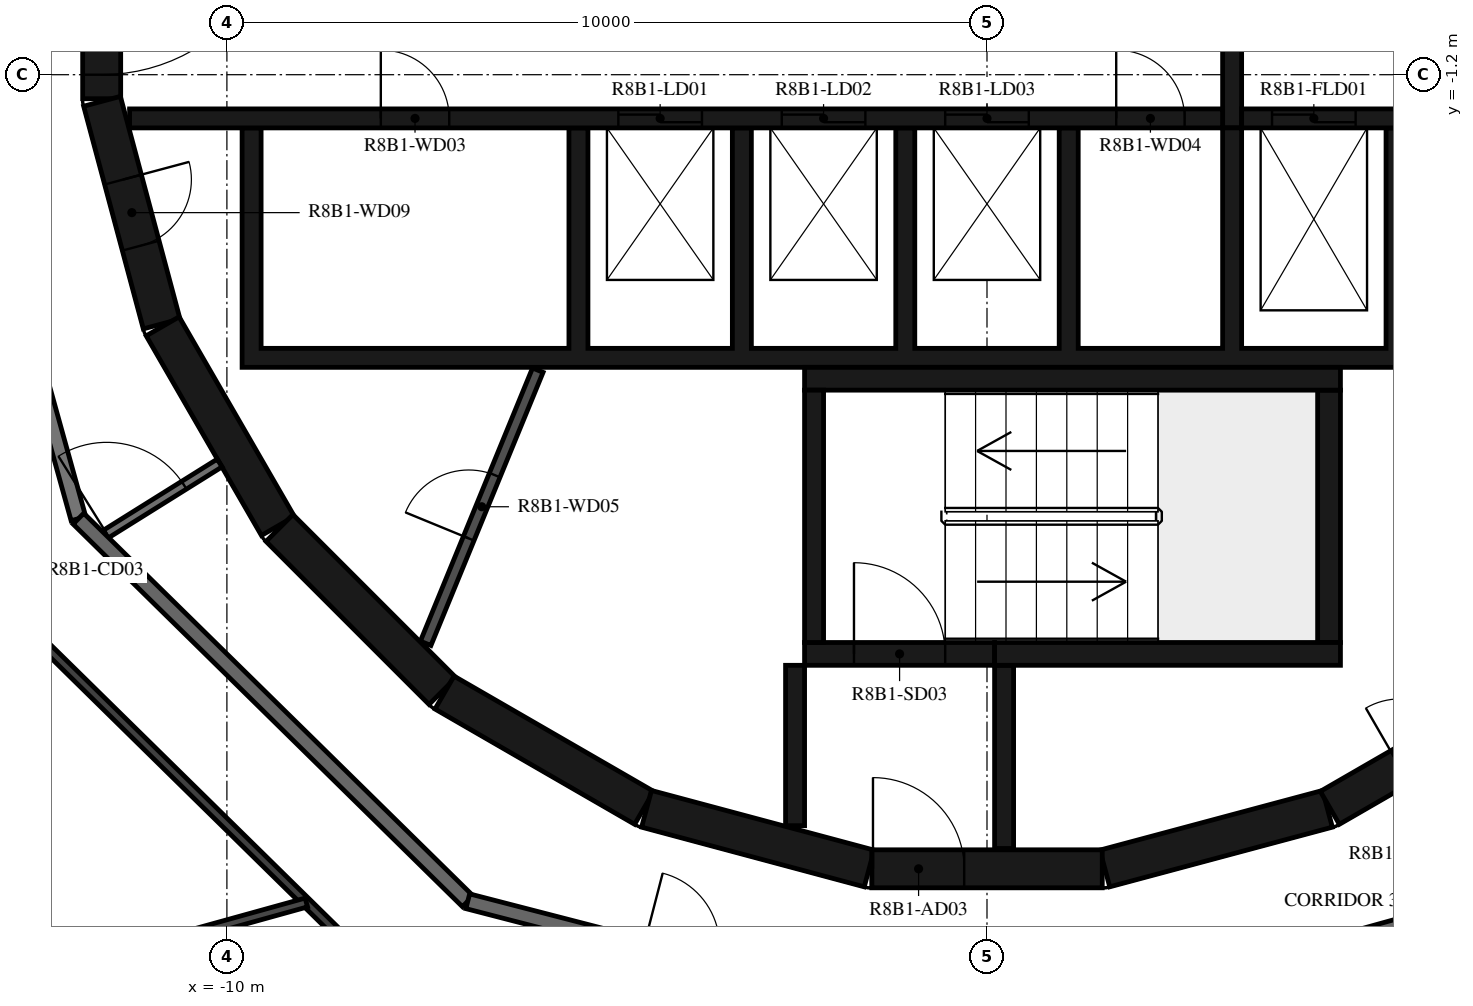
"""IFC4 building model, lengths in metres.
Left out: names, types, materials, properties, quantities, classifications, styles, units other than length and angle.
Written with IfcOpenShell. Run it as: python <this file> out.ifc"""

import sys

from ifc_helpers import new_model, si_unit, direction, frame, frame_2d, origin, place, context, subcontext, project, spatial, polyline, rectangle, outline, extrude, element, fill, save


model = new_model("IFC4")
c1 = context("Model", 3, precision=1e-05, world=origin(), true_north=direction((0.0, 1.0)))
c2 = subcontext(c1, "Body", "Model", "MODEL_VIEW")
j1 = project(units=[si_unit("LENGTHUNIT", "METRE"), si_unit("PLANEANGLEUNIT", "RADIAN")], contexts=[c1])
p1 = place(None, origin())
s1 = spatial("IfcSite", under=j1, at=p1, CompositionType="ELEMENT")
p2 = place(p1, origin())
s2 = spatial("IfcBuilding", under=s1, at=p2, CompositionType="ELEMENT")
p3 = place(p2, frame((0.0, 0.0, 308.7)))
s3 = spatial("IfcBuildingStorey", under=s2, at=p3, CompositionType="ELEMENT", Elevation=308.7)
p4 = place(p3, frame((1.55, -11.643, 0.0), z_axis=(0.0, 0.0, 1.0), x_axis=(0.965948410781, 0.258734743916, 0.0)))
e1 = element("IfcWall", 1, at=p4, inside=s3, PredefinedType="SHEAR", context=c2, shape_type="SweptSolid", body=[
    extrude(rectangle(XDim=3.033, YDim=0.5, at=frame_2d((1.516, 0.0))), origin(), (0.0, 0.0, 1.0), 3.12),
])
p5 = place(p3, frame((4.51, -10.845, 0.0), z_axis=(0.0, 0.0, 1.0), x_axis=(0.865975092491, 0.500087131594, 0.0)))
e2 = element("IfcWall", 2, at=p5, inside=s3, PredefinedType="SHEAR", context=c2, shape_type="SweptSolid", body=[
    extrude(rectangle(XDim=3.033, YDim=0.5, at=frame_2d((1.516, 0.0))), origin(), (0.0, 0.0, 1.0), 3.12),
])
p6 = place(p5, frame((1.066, 0.0, 0.0)))
e3 = element("IfcOpeningElement", 3, at=p6, cuts=e2, PredefinedType="OPENING", context=c2, shape_type="SweptSolid", body=[
    extrude(rectangle(XDim=0.9, YDim=2.1, at=frame_2d((0.45, 1.05))), frame((0.0, 0.26, 0.0), z_axis=(0.0, -1.0, 0.0), x_axis=(1.0, 0.0, 0.0)), (0.0, 0.0, 1.0), 0.52),
])
p7 = place(p3, frame((-11.647, 1.516, 0.0), z_axis=(0.0, 0.0, 1.0), x_axis=(0.0, -1.0, 0.0)))
e4 = element("IfcWall", 4, at=p7, inside=s3, PredefinedType="SHEAR", context=c2, shape_type="SweptSolid", body=[
    extrude(rectangle(XDim=3.033, YDim=0.5, at=frame_2d((1.516, 0.0))), origin(), (0.0, 0.0, 1.0), 3.12),
])
p8 = place(p7, frame((0.316, 0.0, 0.0)))
e5 = element("IfcOpeningElement", 5, at=p8, cuts=e4, PredefinedType="OPENING", context=c2, shape_type="SweptSolid", body=[
    extrude(rectangle(XDim=2.4, YDim=2.1, at=frame_2d((1.2, 1.05))), frame((0.0, 0.26, 0.0), z_axis=(0.0, -1.0, 0.0), x_axis=(1.0, 0.0, 0.0)), (0.0, 0.0, 1.0), 0.52),
])
p9 = place(p3, frame((-11.643, -1.55, 0.0), z_axis=(0.0, 0.0, 1.0), x_axis=(0.258734743916, -0.965948410781, 0.0)))
e6 = element("IfcWall", 6, at=p9, inside=s3, PredefinedType="SHEAR", context=c2, shape_type="SweptSolid", body=[
    extrude(rectangle(XDim=3.033, YDim=0.5, at=frame_2d((1.516, 0.0))), origin(), (0.0, 0.0, 1.0), 3.12),
])
p10 = place(p9, frame((1.066, 0.0, 0.0)))
e7 = element("IfcOpeningElement", 7, at=p10, cuts=e6, PredefinedType="OPENING", context=c2, shape_type="SweptSolid", body=[
    extrude(rectangle(XDim=0.9, YDim=2.1, at=frame_2d((0.45, 1.05))), frame((0.0, 0.26, 0.0), z_axis=(0.0, -1.0, 0.0), x_axis=(1.0, 0.0, 0.0)), (0.0, 0.0, 1.0), 0.52),
])
p11 = place(p3, frame((-10.845, -4.51, 0.0), z_axis=(0.0, 0.0, 1.0), x_axis=(0.500087131594, -0.865975092491, 0.0)))
e8 = element("IfcWall", 8, at=p11, inside=s3, PredefinedType="SHEAR", context=c2, shape_type="SweptSolid", body=[
    extrude(rectangle(XDim=3.033, YDim=0.5, at=frame_2d((1.516, 0.0))), origin(), (0.0, 0.0, 1.0), 3.12),
])
p12 = place(p3, frame((-9.308, -7.164, 0.0), z_axis=(0.0, 0.0, 1.0), x_axis=(0.707106781187, -0.707106781187, 0.0)))
e9 = element("IfcWall", 9, at=p12, inside=s3, PredefinedType="SHEAR", context=c2, shape_type="SweptSolid", body=[
    extrude(rectangle(XDim=3.032, YDim=0.5, at=frame_2d((1.516, 0.0))), origin(), (0.0, 0.0, 1.0), 3.12),
])
for number, where, z_axis, x_axis in (
    (10, (-7.137, -9.329, 0.0), (0.0, 0.0, 1.0), (0.866, -0.5, 0.0)),
    (11, (-4.479, -10.858, 0.0), (0.0, 0.0, 1.0), (0.966, -0.259, 0.0)),
):
    element("IfcWall", number, at=place(p3, frame(where, z_axis=z_axis, x_axis=x_axis)), inside=s3, PredefinedType="SHEAR", context=c2, shape_type="SweptSolid", body=[
        extrude(rectangle(XDim=3.033, YDim=0.5, at=frame_2d((1.516, 0.0))), origin(), (0.0, 0.0, 1.0), 3.12),
    ])
p13 = place(p3, frame((-1.516, -11.647, 0.0), z_axis=(0.0, 0.0, 1.0), x_axis=(1.0, 0.0, 0.0)))
e12 = element("IfcWall", 12, at=p13, inside=s3, PredefinedType="SHEAR", context=c2, shape_type="SweptSolid", body=[
    extrude(rectangle(XDim=3.033, YDim=0.5, at=frame_2d((1.516, 0.0))), origin(), (0.0, 0.0, 1.0), 3.12),
])
p14 = place(p13, frame((0.016, 0.0, 0.0)))
e13 = element("IfcOpeningElement", 13, at=p14, cuts=e12, PredefinedType="OPENING", context=c2, shape_type="SweptSolid", body=[
    extrude(rectangle(XDim=1.2, YDim=2.1, at=frame_2d((0.6, 1.05))), frame((0.0, 0.26, 0.0), z_axis=(0.0, -1.0, 0.0), x_axis=(1.0, 0.0, 0.0)), (0.0, 0.0, 1.0), 0.52),
])
p15 = place(p3, frame((-2.275, -8.67, 0.0), z_axis=(0.0, 0.0, 1.0), x_axis=(0.0, 1.0, 0.0)))
e14 = element("IfcWall", 14, at=p15, inside=s3, PredefinedType="SHEAR", context=c2, shape_type="SweptSolid", body=[
    extrude(rectangle(XDim=3.32, YDim=0.25, at=frame_2d((1.66, 0.0))), origin(), (0.0, 0.0, 1.0), 3.12),
])
p16 = place(p3, frame((-2.4, -5.2, 0.0), z_axis=(0.0, 0.0, 1.0), x_axis=(1.0, 0.0, 0.0)))
e15 = element("IfcWall", 15, at=p16, inside=s3, PredefinedType="SHEAR", context=c2, shape_type="SweptSolid", body=[
    extrude(rectangle(XDim=7.05, YDim=0.3, at=frame_2d((3.525, 0.0))), origin(), (0.0, 0.0, 1.0), 3.12),
])
p17 = place(p3, frame((4.5, -8.67, 0.0), z_axis=(0.0, 0.0, 1.0), x_axis=(0.0, 1.0, 0.0)))
e16 = element("IfcWall", 16, at=p17, inside=s3, PredefinedType="SHEAR", context=c2, shape_type="SweptSolid", body=[
    extrude(rectangle(XDim=3.32, YDim=0.3, at=frame_2d((1.66, 0.0))), origin(), (0.0, 0.0, 1.0), 3.12),
])
p18 = place(p3, frame((0.1, -8.82, 0.0), z_axis=(0.0, 0.0, 1.0), x_axis=(1.0, 0.0, 0.0)))
e17 = element("IfcWall", 17, at=p18, inside=s3, PredefinedType="SHEAR", context=c2, shape_type="SweptSolid", body=[
    extrude(rectangle(XDim=4.55, YDim=0.3, at=frame_2d((2.275, 0.0))), origin(), (0.0, 0.0, 1.0), 3.12),
])
p19 = place(p3, frame((-2.4, -8.82, 0.0), z_axis=(0.0, 0.0, 1.0), x_axis=(1.0, 0.0, 0.0)))
e18 = element("IfcWall", 18, at=p19, inside=s3, PredefinedType="SHEAR", context=c2, shape_type="SweptSolid", body=[
    extrude(rectangle(XDim=2.5, YDim=0.3, at=frame_2d((1.25, 0.0))), origin(), (0.0, 0.0, 1.0), 3.12),
])
p20 = place(p19, frame((0.65, 0.0, 0.0)))
e19 = element("IfcOpeningElement", 19, at=p20, cuts=e18, PredefinedType="OPENING", context=c2, shape_type="SweptSolid", body=[
    extrude(rectangle(XDim=1.2, YDim=2.1, at=frame_2d((0.6, 1.05))), frame((0.0, 0.16, 0.0), z_axis=(0.0, -1.0, 0.0), x_axis=(1.0, 0.0, 0.0)), (0.0, 0.0, 1.0), 0.32),
])
p21 = place(p3, frame((-2.525, -8.97, 0.0), z_axis=(0.0, 0.0, 1.0), x_axis=(0.0, -1.0, 0.0)))
e20 = element("IfcWall", 20, at=p21, inside=s3, PredefinedType="SHEAR", context=c2, shape_type="SweptSolid", body=[
    extrude(rectangle(XDim=2.11, YDim=0.25, at=frame_2d((1.055, 0.0))), origin(), (0.0, 0.0, 1.0), 3.12),
])
p22 = place(p3, frame((0.225, -8.97, 0.0), z_axis=(0.0, 0.0, 1.0), x_axis=(0.0, -1.0, 0.0)))
e21 = element("IfcWall", 21, at=p22, inside=s3, PredefinedType="SHEAR", context=c2, shape_type="SweptSolid", body=[
    extrude(rectangle(XDim=2.41, YDim=0.25, at=frame_2d((1.205, 0.0))), origin(), (0.0, 0.0, 1.0), 3.12),
])
p23 = place(p3, origin())
e22 = element("IfcWall", 22, at=p23, inside=s3, PredefinedType="SHEAR", context=c2, shape_type="SweptSolid", body=[
    extrude(outline(polyline([(9.8, -5.05), (9.8, -4.8), (9.8, -1.9), (9.55, -1.9), (9.55, -4.8), (7.65, -4.8), (7.65, -1.9), (7.4, -1.9), (7.4, -4.8), (5.5, -4.8), (5.5, -1.9), (5.25, -1.9), (5.25, -4.8), (3.35, -4.8), (3.35, -1.9), (3.1, -1.9), (3.1, -4.8), (1.2, -4.8), (1.2, -1.9), (0.95, -1.9), (0.95, -4.8), (-0.95, -4.8), (-0.95, -1.9), (-1.2, -1.9), (-1.2, -4.8), (-3.1, -4.8), (-3.1, -1.9), (-3.35, -1.9), (-3.35, -4.8), (-5.25, -4.8), (-5.25, -1.9), (-5.5, -1.9), (-5.5, -4.8), (-9.55, -4.8), (-9.55, -1.9), (-9.8, -1.9), (-9.8, -4.8), (-9.8, -5.05), (9.8, -5.05)])), origin(), (0.0, 0.0, 1.0), 3.12),
])
p24 = place(p3, frame((-11.28, -1.775, 0.0), z_axis=(0.0, 0.0, 1.0), x_axis=(1.0, 0.0, 0.0)))
e23 = element("IfcWall", 23, at=p24, inside=s3, PredefinedType="SHEAR", context=c2, shape_type="SweptSolid", body=[
    extrude(rectangle(XDim=14.38, YDim=0.25, at=frame_2d((7.19, 0.0))), origin(), (0.0, 0.0, 1.0), 3.12),
])
p25 = place(p24, frame((6.43, 0.0, 0.0)))
e24 = element("IfcOpeningElement", 24, at=p25, cuts=e23, PredefinedType="OPENING", context=c2, shape_type="SweptSolid", body=[
    extrude(rectangle(XDim=1.1, YDim=2.1, at=frame_2d((0.55, 1.05))), frame((0.0, 0.135, 0.0), z_axis=(0.0, -1.0, 0.0), x_axis=(1.0, 0.0, 0.0)), (0.0, 0.0, 1.0), 0.27),
])
p26 = place(p24, frame((8.58, 0.0, 0.0)))
e25 = element("IfcOpeningElement", 25, at=p26, cuts=e23, PredefinedType="OPENING", context=c2, shape_type="SweptSolid", body=[
    extrude(rectangle(XDim=1.1, YDim=2.1, at=frame_2d((0.55, 1.05))), frame((0.0, 0.135, 0.0), z_axis=(0.0, -1.0, 0.0), x_axis=(1.0, 0.0, 0.0)), (0.0, 0.0, 1.0), 0.27),
])
p27 = place(p24, frame((10.73, 0.0, 0.0)))
e26 = element("IfcOpeningElement", 26, at=p27, cuts=e23, PredefinedType="OPENING", context=c2, shape_type="SweptSolid", body=[
    extrude(rectangle(XDim=1.1, YDim=2.1, at=frame_2d((0.55, 1.05))), frame((0.0, 0.135, 0.0), z_axis=(0.0, -1.0, 0.0), x_axis=(1.0, 0.0, 0.0)), (0.0, 0.0, 1.0), 0.27),
])
p28 = place(p24, frame((3.305, 0.0, 0.0)))
e27 = element("IfcOpeningElement", 27, at=p28, cuts=e23, PredefinedType="OPENING", context=c2, shape_type="SweptSolid", body=[
    extrude(rectangle(XDim=0.9, YDim=2.1, at=frame_2d((0.45, 1.05))), frame((0.0, 0.135, 0.0), z_axis=(0.0, -1.0, 0.0), x_axis=(1.0, 0.0, 0.0)), (0.0, 0.0, 1.0), 0.27),
])
p29 = place(p24, frame((12.98, 0.0, 0.0)))
e28 = element("IfcOpeningElement", 28, at=p29, cuts=e23, PredefinedType="OPENING", context=c2, shape_type="SweptSolid", body=[
    extrude(rectangle(XDim=0.9, YDim=2.1, at=frame_2d((0.45, 1.05))), frame((0.0, 0.135, 0.0), z_axis=(0.0, -1.0, 0.0), x_axis=(1.0, 0.0, 0.0)), (0.0, 0.0, 1.0), 0.27),
])
p30 = place(p3, frame((3.35, -1.775, 0.0), z_axis=(0.0, 0.0, 1.0), x_axis=(1.0, 0.0, 0.0)))
e29 = element("IfcWall", 29, at=p30, inside=s3, PredefinedType="SHEAR", context=c2, shape_type="SweptSolid", body=[
    extrude(rectangle(XDim=7.93, YDim=0.25, at=frame_2d((3.965, 0.0))), origin(), (0.0, 0.0, 1.0), 3.12),
])
p31 = place(p30, frame((0.4, 0.0, 0.0)))
e30 = element("IfcOpeningElement", 30, at=p31, cuts=e29, PredefinedType="OPENING", context=c2, shape_type="SweptSolid", body=[
    extrude(rectangle(XDim=1.1, YDim=2.4, at=frame_2d((0.55, 1.2))), frame((0.0, 0.135, 0.0), z_axis=(0.0, -1.0, 0.0), x_axis=(1.0, 0.0, 0.0)), (0.0, 0.0, 1.0), 0.27),
])
p32 = place(p30, frame((2.55, 0.0, 0.0)))
e31 = element("IfcOpeningElement", 31, at=p32, cuts=e29, PredefinedType="OPENING", context=c2, shape_type="SweptSolid", body=[
    extrude(rectangle(XDim=1.1, YDim=2.4, at=frame_2d((0.55, 1.2))), frame((0.0, 0.135, 0.0), z_axis=(0.0, -1.0, 0.0), x_axis=(1.0, 0.0, 0.0)), (0.0, 0.0, 1.0), 0.27),
])
p33 = place(p30, frame((4.7, 0.0, 0.0)))
e32 = element("IfcOpeningElement", 32, at=p33, cuts=e29, PredefinedType="OPENING", context=c2, shape_type="SweptSolid", body=[
    extrude(rectangle(XDim=1.1, YDim=2.4, at=frame_2d((0.55, 1.2))), frame((0.0, 0.135, 0.0), z_axis=(0.0, -1.0, 0.0), x_axis=(1.0, 0.0, 0.0)), (0.0, 0.0, 1.0), 0.27),
])
p34 = place(p3, frame((3.225, -1.9, 0.0), z_axis=(0.0, 0.0, 1.0), x_axis=(0.0, 1.0, 0.0)))
e33 = element("IfcWall", 33, at=p34, inside=s3, PredefinedType="SHEAR", context=c2, shape_type="SweptSolid", body=[
    extrude(rectangle(XDim=3.8, YDim=0.25, at=frame_2d((1.9, 0.0))), origin(), (0.0, 0.0, 1.0), 3.12),
])
p35 = place(p3, frame((-7.385, -8.681, 0.0), z_axis=(0.0, 0.0, 1.0), x_axis=(0.379804590409, 0.925066739811, 0.0)))
e34 = element("IfcWall", 34, at=p35, inside=s3, PredefinedType="PARTITIONING", context=c2, shape_type="SweptSolid", body=[
    extrude(rectangle(XDim=3.885, YDim=0.15, at=frame_2d((1.942, 0.0))), origin(), (0.0, 0.0, 1.0), 3.12),
])
p36 = place(p35, frame((1.493, 0.0, 0.0)))
e35 = element("IfcOpeningElement", 35, at=p36, cuts=e34, PredefinedType="OPENING", context=c2, shape_type="SweptSolid", body=[
    extrude(rectangle(XDim=0.9, YDim=2.1, at=frame_2d((0.45, 1.05))), frame((0.0, 0.085, 0.0), z_axis=(0.0, -1.0, 0.0), x_axis=(1.0, 0.0, 0.0)), (0.0, 0.0, 1.0), 0.17),
])
p37 = place(p3, frame((-11.687, -7.303, 0.0), z_axis=(0.0, 0.0, 1.0), x_axis=(0.848064094072, 0.529893661357, 0.0)))
e36 = element("IfcWall", 36, at=p37, inside=s3, PredefinedType="PARTITIONING", context=c2, shape_type="SweptSolid", body=[
    extrude(rectangle(XDim=1.876, YDim=0.12, at=frame_2d((0.938, 0.0))), origin(), (0.0, 0.0, 1.0), 3.12),
])
p38 = place(p37, frame((0.125, 0.0, 0.0)))
e37 = element("IfcOpeningElement", 37, at=p38, cuts=e36, PredefinedType="OPENING", context=c2, shape_type="SweptSolid", body=[
    extrude(rectangle(XDim=1.2, YDim=2.1, at=frame_2d((0.6, 1.05))), frame((0.0, 0.07, 0.0), z_axis=(0.0, -1.0, 0.0), x_axis=(1.0, 0.0, 0.0)), (0.0, 0.0, 1.0), 0.14),
])
p39 = place(p3, frame((-13.872, -0.121, 0.0), z_axis=(0.0, 0.0, 1.0), x_axis=(0.267254575108, -0.963625960674, 0.0)))
e38 = element("IfcWall", 38, at=p39, inside=s3, PredefinedType="STANDARD", context=c2, shape_type="SweptSolid", body=[
    extrude(rectangle(XDim=7.181, YDim=0.2, at=frame_2d((3.591, 0.0))), origin(), (0.0, 0.0, 1.0), 3.12),
])
p40 = place(p3, frame((-11.953, -7.041, 0.0), z_axis=(0.0, 0.0, 1.0), x_axis=(0.713250549143, -0.70090916255, 0.0)))
e39 = element("IfcWall", 39, at=p40, inside=s3, PredefinedType="STANDARD", context=c2, shape_type="SweptSolid", body=[
    extrude(rectangle(XDim=7.181, YDim=0.2, at=frame_2d((3.59, 0.0))), origin(), (0.0, 0.0, 1.0), 3.12),
])
p41 = place(p3, frame((-6.831, -12.074, 0.0), z_axis=(0.0, 0.0, 1.0), x_axis=(0.968144780225, -0.250391063186, 0.0)))
e40 = element("IfcWall", 40, at=p41, inside=s3, PredefinedType="STANDARD", context=c2, shape_type="SweptSolid", body=[
    extrude(rectangle(XDim=7.181, YDim=0.2, at=frame_2d((3.591, 0.0))), origin(), (0.0, 0.0, 1.0), 3.12),
])
p42 = place(p41, frame((2.39, 0.0, 0.0)))
e41 = element("IfcOpeningElement", 41, at=p42, cuts=e40, PredefinedType="OPENING", context=c2, shape_type="SweptSolid", body=[
    extrude(rectangle(XDim=1.0, YDim=2.1, at=frame_2d((0.5, 1.05))), frame((0.0, 0.11, 0.0), z_axis=(0.0, -1.0, 0.0), x_axis=(1.0, 0.0, 0.0)), (0.0, 0.0, 1.0), 0.22),
])
p43 = place(p41, frame((5.69, 0.0, 0.0)))
e42 = element("IfcOpeningElement", 42, at=p43, cuts=e40, PredefinedType="OPENING", context=c2, shape_type="SweptSolid", body=[
    extrude(rectangle(XDim=1.0, YDim=2.1, at=frame_2d((0.5, 1.05))), frame((0.0, 0.11, 0.0), z_axis=(0.0, -1.0, 0.0), x_axis=(1.0, 0.0, 0.0)), (0.0, 0.0, 1.0), 0.22),
])
p44 = place(p3, frame((0.121, -13.872, 0.0), z_axis=(0.0, 0.0, 1.0), x_axis=(0.963625960674, 0.267254575108, 0.0)))
e43 = element("IfcWall", 43, at=p44, inside=s3, PredefinedType="STANDARD", context=c2, shape_type="SweptSolid", body=[
    extrude(rectangle(XDim=7.181, YDim=0.2, at=frame_2d((3.591, 0.0))), origin(), (0.0, 0.0, 1.0), 3.12),
])
p45 = place(p3, frame((-13.291, -7.829, 0.0), z_axis=(0.0, 0.0, 1.0), x_axis=(0.71326209988, -0.700897408238, 0.0)))
e44 = element("IfcWall", 44, at=p45, inside=s3, PredefinedType="PARTITIONING", context=c2, shape_type="SweptSolid", body=[
    extrude(rectangle(XDim=7.029, YDim=0.12, at=frame_2d((3.515, 0.0))), origin(), (0.0, 0.0, 1.0), 3.12),
])
p46 = place(p3, frame((-14.066, -13.508, 0.0), z_axis=(0.0, 0.0, 1.0), x_axis=(0.963634530082, 0.267223674913, 0.0)))
e45 = element("IfcWall", 45, at=p46, inside=s3, PredefinedType="PARTITIONING", context=c2, shape_type="SweptSolid", body=[
    extrude(rectangle(XDim=5.304, YDim=0.12, at=frame_2d((2.652, 0.0))), origin(), (0.0, 0.0, 1.0), 2.73),
])
p47 = place(p20, origin())
e46 = element("IfcDoor", 46, at=p47, inside=s3, OperationType="SINGLE_SWING_LEFT", PredefinedType="DOOR", context=c2, shape_type="SweptSolid", body=[
    extrude(rectangle(XDim=1.2, YDim=2.1, at=frame_2d((0.6, 1.05))), frame((0.0, 0.025, 0.0), z_axis=(0.0, -1.0, 0.0), x_axis=(1.0, 0.0, 0.0)), (0.0, 0.0, 1.0), 0.05),
])
fill(e19, e46)
p48 = place(p14, origin())
e47 = element("IfcDoor", 47, at=p48, inside=s3, OperationType="SINGLE_SWING_RIGHT", PredefinedType="DOOR", context=c2, shape_type="SweptSolid", body=[
    extrude(rectangle(XDim=1.2, YDim=2.1, at=frame_2d((0.6, 1.05))), frame((0.0, 0.025, 0.0), z_axis=(0.0, -1.0, 0.0), x_axis=(1.0, 0.0, 0.0)), (0.0, 0.0, 1.0), 0.05),
])
fill(e13, e47)
p49 = place(p8, origin())
e48 = element("IfcDoor", 48, at=p49, inside=s3, OperationType="DOUBLE_DOOR_SINGLE_SWING", PredefinedType="DOOR", context=c2, shape_type="SweptSolid", body=[
    extrude(rectangle(XDim=2.4, YDim=2.1, at=frame_2d((1.2, 1.05))), frame((0.0, 0.025, 0.0), z_axis=(0.0, -1.0, 0.0), x_axis=(1.0, 0.0, 0.0)), (0.0, 0.0, 1.0), 0.05),
])
fill(e5, e48)
p50 = place(p25, origin())
e49 = element("IfcDoor", 49, at=p50, inside=s3, OperationType="DOUBLE_DOOR_SLIDING", PredefinedType="DOOR", context=c2, shape_type="SweptSolid", body=[
    extrude(rectangle(XDim=1.1, YDim=2.1, at=frame_2d((0.55, 1.05))), frame((0.0, 0.025, 0.0), z_axis=(0.0, -1.0, 0.0), x_axis=(1.0, 0.0, 0.0)), (0.0, 0.0, 1.0), 0.05),
])
fill(e24, e49)
p51 = place(p26, origin())
e50 = element("IfcDoor", 50, at=p51, inside=s3, OperationType="DOUBLE_DOOR_SLIDING", PredefinedType="DOOR", context=c2, shape_type="SweptSolid", body=[
    extrude(rectangle(XDim=1.1, YDim=2.1, at=frame_2d((0.55, 1.05))), frame((0.0, 0.025, 0.0), z_axis=(0.0, -1.0, 0.0), x_axis=(1.0, 0.0, 0.0)), (0.0, 0.0, 1.0), 0.05),
])
fill(e25, e50)
p52 = place(p27, origin())
e51 = element("IfcDoor", 51, at=p52, inside=s3, OperationType="DOUBLE_DOOR_SLIDING", PredefinedType="DOOR", context=c2, shape_type="SweptSolid", body=[
    extrude(rectangle(XDim=1.1, YDim=2.1, at=frame_2d((0.55, 1.05))), frame((0.0, 0.025, 0.0), z_axis=(0.0, -1.0, 0.0), x_axis=(1.0, 0.0, 0.0)), (0.0, 0.0, 1.0), 0.05),
])
fill(e26, e51)
p53 = place(p31, origin())
e52 = element("IfcDoor", 52, at=p53, inside=s3, OperationType="DOUBLE_DOOR_SLIDING", PredefinedType="DOOR", context=c2, shape_type="SweptSolid", body=[
    extrude(rectangle(XDim=1.1, YDim=2.4, at=frame_2d((0.55, 1.2))), frame((0.0, 0.025, 0.0), z_axis=(0.0, -1.0, 0.0), x_axis=(1.0, 0.0, 0.0)), (0.0, 0.0, 1.0), 0.05),
])
fill(e30, e52)
p54 = place(p28, origin())
e53 = element("IfcDoor", 53, at=p54, inside=s3, OperationType="SINGLE_SWING_LEFT", PredefinedType="DOOR", context=c2, shape_type="SweptSolid", body=[
    extrude(rectangle(XDim=0.9, YDim=2.1, at=frame_2d((0.45, 1.05))), frame((0.0, 0.025, 0.0), z_axis=(0.0, -1.0, 0.0), x_axis=(1.0, 0.0, 0.0)), (0.0, 0.0, 1.0), 0.05),
])
fill(e27, e53)
p55 = place(p29, origin())
e54 = element("IfcDoor", 54, at=p55, inside=s3, OperationType="SINGLE_SWING_RIGHT", PredefinedType="DOOR", context=c2, shape_type="SweptSolid", body=[
    extrude(rectangle(XDim=0.9, YDim=2.1, at=frame_2d((0.45, 1.05))), frame((0.0, 0.025, 0.0), z_axis=(0.0, -1.0, 0.0), x_axis=(1.0, 0.0, 0.0)), (0.0, 0.0, 1.0), 0.05),
])
fill(e28, e54)
p56 = place(p36, origin())
e55 = element("IfcDoor", 55, at=p56, inside=s3, OperationType="SINGLE_SWING_LEFT", PredefinedType="DOOR", context=c2, shape_type="SweptSolid", body=[
    extrude(rectangle(XDim=0.9, YDim=2.1, at=frame_2d((0.45, 1.05))), frame((0.0, 0.025, 0.0), z_axis=(0.0, -1.0, 0.0), x_axis=(1.0, 0.0, 0.0)), (0.0, 0.0, 1.0), 0.05),
])
fill(e35, e55)
p57 = place(p10, origin())
e56 = element("IfcDoor", 56, at=p57, inside=s3, OperationType="SINGLE_SWING_LEFT", PredefinedType="DOOR", context=c2, shape_type="SweptSolid", body=[
    extrude(rectangle(XDim=0.9, YDim=2.1, at=frame_2d((0.45, 1.05))), frame((0.0, 0.025, 0.0), z_axis=(0.0, -1.0, 0.0), x_axis=(1.0, 0.0, 0.0)), (0.0, 0.0, 1.0), 0.05),
])
fill(e7, e56)
p58 = place(p38, origin())
e57 = element("IfcDoor", 57, at=p58, inside=s3, OperationType="DOUBLE_DOOR_SINGLE_SWING", PredefinedType="DOOR", context=c2, shape_type="SweptSolid", body=[
    extrude(rectangle(XDim=1.2, YDim=2.1, at=frame_2d((0.6, 1.05))), frame((0.0, 0.025, 0.0), z_axis=(0.0, -1.0, 0.0), x_axis=(1.0, 0.0, 0.0)), (0.0, 0.0, 1.0), 0.05),
])
fill(e37, e57)
save(model, sys.argv[1])
